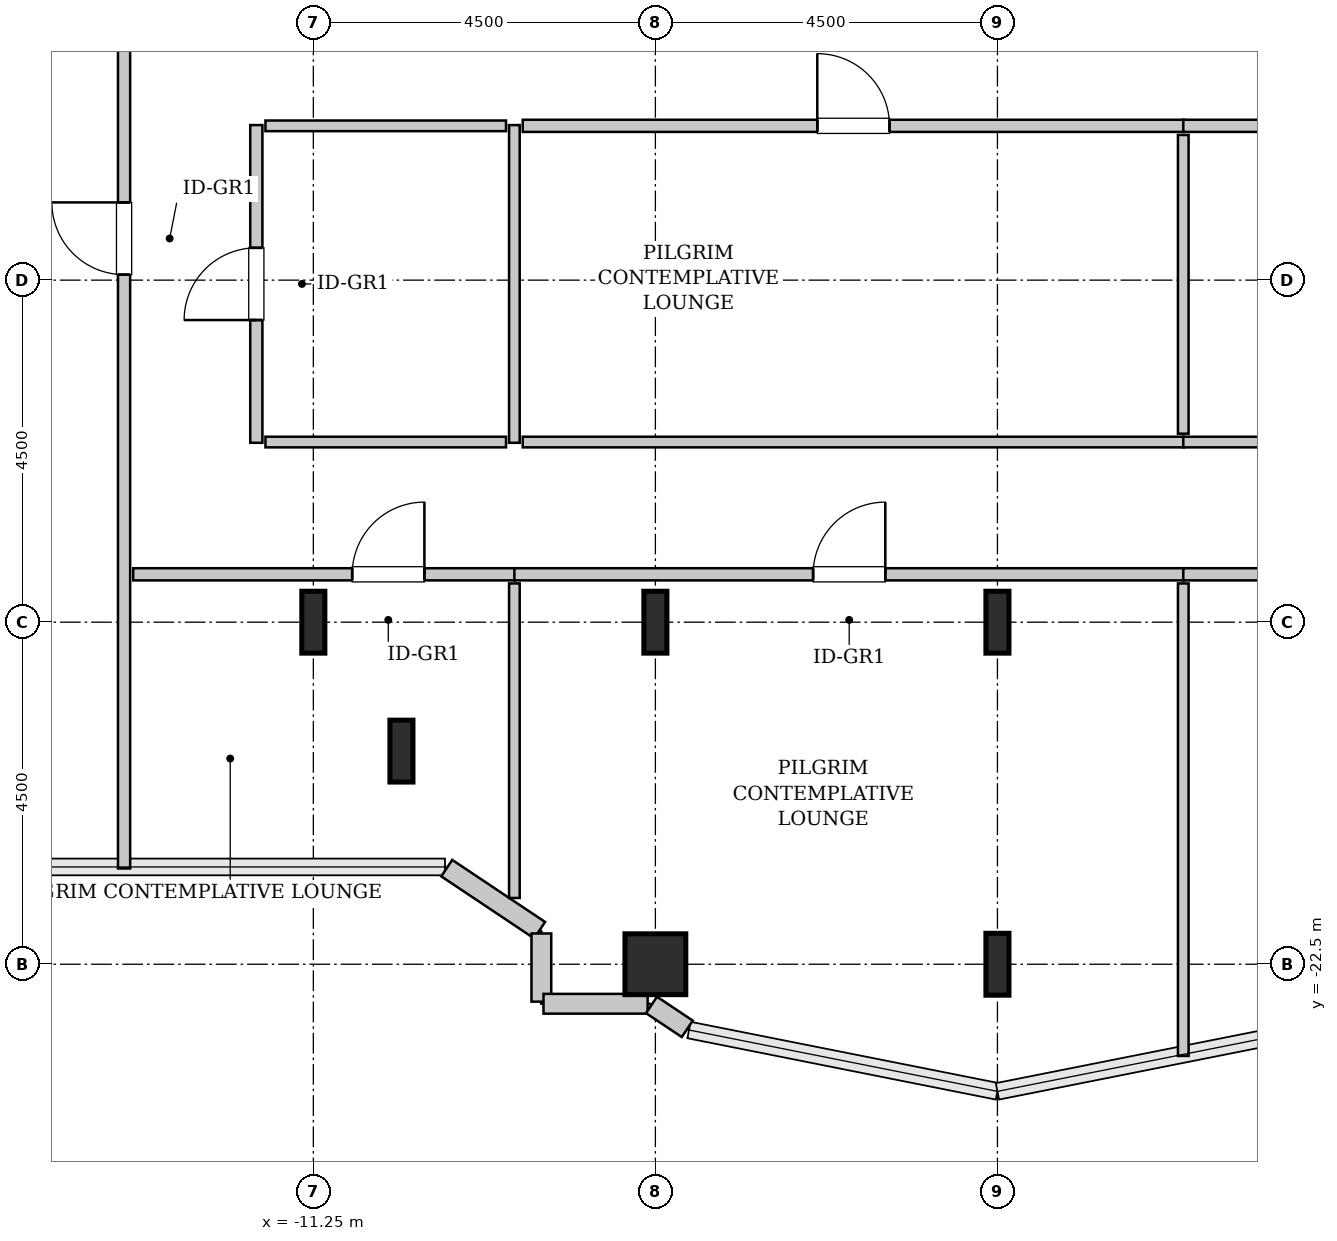
"""IFC4 building model, lengths in metres.
Left out: names, types, materials, properties, quantities, classifications, styles, units other than length and angle.
Written with IfcOpenShell. Run it as: python <this file> out.ifc"""

import sys

from ifc_helpers import new_model, si_unit, direction, frame, frame_2d, origin, origin_2d, place, context, subcontext, project, spatial, rectangle, hollow_rectangle, i_section, extrude, source, transform, mapped, element, fill, save


model = new_model("IFC4")
c1 = context("Model", 3, precision=1e-05, world=origin(), true_north=direction((0.0, 1.0)))
c2 = subcontext(c1, "Body", "Model", "MODEL_VIEW")
j1 = project(units=[si_unit("LENGTHUNIT", "METRE"), si_unit("PLANEANGLEUNIT", "RADIAN")], contexts=[c1])
p1 = place(None, origin())
s1 = spatial("IfcSite", under=j1, at=p1, CompositionType="ELEMENT")
p2 = place(p1, origin())
s2 = spatial("IfcBuilding", under=s1, at=p2, CompositionType="ELEMENT")
p3 = place(p2, frame((0.0, 0.0, 167.8)))
s3 = spatial("IfcBuildingStorey", under=s2, at=p3, CompositionType="ELEMENT", Elevation=167.8)
m1 = source(origin(), c2, "Body", "SweptSolid", [
    extrude(i_section(OverallWidth=0.303, OverallDepth=0.814, WebThickness=0.021, FlangeThickness=0.04, FilletRadius=0.03, at=origin_2d()), origin(), (0.0, 0.0, 1.0), 3.8),
])
for number, where, z_axis, x_axis in (
    (1, (-11.25, -18.0, 0.0), (0.0, 0.0, 1.0), (1.0, 0.0, 0.0)),
    (2, (-10.091, -19.696, 0.0), (0.0, 0.0, 1.0), (1.0, 0.0, 0.0)),
):
    element("IfcColumn", number, at=place(p3, frame(where, z_axis=z_axis, x_axis=x_axis)), inside=s3, PredefinedType="COLUMN", context=c2, shape_type="MappedRepresentation", body=[
        mapped(m1, transform((0.0, 0.0, 0.0), x_axis=(1.0, 0.0, 0.0), y_axis=(0.0, 1.0, 0.0), z_axis=(0.0, 0.0, 1.0), scale=1.0)),
    ])
m2 = source(origin(), c2, "Body", "SweptSolid", [
    extrude(hollow_rectangle(XDim=0.8, YDim=0.8, WallThickness=0.04, InnerFilletRadius=0.04, OuterFilletRadius=0.08, at=origin_2d()), origin(), (0.0, 0.0, 1.0), 3.8),
])
p4 = place(p3, frame((-6.75, -22.5, 0.0), z_axis=(0.0, 0.0, 1.0), x_axis=(1.0, 0.0, 0.0)))
e3 = element("IfcColumn", 3, at=p4, inside=s3, PredefinedType="COLUMN", context=c2, shape_type="MappedRepresentation", body=[
    mapped(m2, transform((0.0, 0.0, 0.0), x_axis=(1.0, 0.0, 0.0), y_axis=(0.0, 1.0, 0.0), z_axis=(0.0, 0.0, 1.0), scale=1.0)),
])
for number, where, z_axis, x_axis in (
    (4, (-6.75, -18.0, 0.0), (0.0, 0.0, 1.0), (1.0, 0.0, 0.0)),
    (5, (-2.25, -22.5, 0.0), (0.0, 0.0, 1.0), (1.0, 0.0, 0.0)),
    (6, (-2.25, -18.0, 0.0), (0.0, 0.0, 1.0), (1.0, 0.0, 0.0)),
):
    element("IfcColumn", number, at=place(p3, frame(where, z_axis=z_axis, x_axis=x_axis)), inside=s3, PredefinedType="COLUMN", context=c2, shape_type="MappedRepresentation", body=[
        mapped(m1, transform((0.0, 0.0, 0.0), x_axis=(1.0, 0.0, 0.0), y_axis=(0.0, 1.0, 0.0), z_axis=(0.0, 0.0, 1.0), scale=1.0)),
    ])
m3 = source(origin(), c2, "Body", "SweptSolid", [
    extrude(rectangle(XDim=1.469, YDim=0.26, at=frame_2d((0.734, 0.0))), origin(), (0.0, 0.0, 1.0), 3.55),
])
p5 = place(p3, frame((-9.495, -21.236, 0.0), z_axis=(0.0, 0.0, 1.0), x_axis=(0.831461760506, -0.555581983884, 0.0)))
e7 = element("IfcWall", 7, at=p5, inside=s3, PredefinedType="SOLIDWALL", context=c2, shape_type="MappedRepresentation", body=[
    mapped(m3, transform((0.0, 0.0, 0.0), x_axis=(1.0, 0.0, 0.0), y_axis=(0.0, 1.0, 0.0), z_axis=(0.0, 0.0, 1.0), scale=1.0)),
])
m4 = source(origin(), c2, "Body", "SweptSolid", [
    extrude(rectangle(XDim=0.897, YDim=0.26, at=frame_2d((0.448, 0.0))), origin(), (0.0, 0.0, 1.0), 3.55),
])
p6 = place(p3, frame((-8.25, -22.095, 0.0), z_axis=(0.0, 0.0, 1.0), x_axis=(0.0, -1.0, 0.0)))
e8 = element("IfcWall", 8, at=p6, inside=s3, PredefinedType="SOLIDWALL", context=c2, shape_type="MappedRepresentation", body=[
    mapped(m4, transform((0.0, 0.0, 0.0), x_axis=(1.0, 0.0, 0.0), y_axis=(0.0, 1.0, 0.0), z_axis=(0.0, 0.0, 1.0), scale=1.0)),
])
m5 = source(origin(), c2, "Body", "SweptSolid", [
    extrude(rectangle(XDim=1.37, YDim=0.26, at=frame_2d((0.685, 0.0))), origin(), (0.0, 0.0, 1.0), 3.55),
])
p7 = place(p3, frame((-8.222, -23.02, 0.0), z_axis=(0.0, 0.0, 1.0), x_axis=(1.0, 0.0, 0.0)))
e9 = element("IfcWall", 9, at=p7, inside=s3, PredefinedType="SOLIDWALL", context=c2, shape_type="MappedRepresentation", body=[
    mapped(m5, transform((0.0, 0.0, 0.0), x_axis=(1.0, 0.0, 0.0), y_axis=(0.0, 1.0, 0.0), z_axis=(0.0, 0.0, 1.0), scale=1.0)),
])
m6 = source(origin(), c2, "Body", "SweptSolid", [
    extrude(rectangle(XDim=0.565, YDim=0.26, at=frame_2d((0.283, 0.0))), origin(), (0.0, 0.0, 1.0), 3.55),
])
p8 = place(p3, frame((-6.801, -23.036, 0.0), z_axis=(0.0, 0.0, 1.0), x_axis=(0.831651492666, -0.555297933317, 0.0)))
e10 = element("IfcWall", 10, at=p8, inside=s3, PredefinedType="SOLIDWALL", context=c2, shape_type="MappedRepresentation", body=[
    mapped(m6, transform((0.0, 0.0, 0.0), x_axis=(1.0, 0.0, 0.0), y_axis=(0.0, 1.0, 0.0), z_axis=(0.0, 0.0, 1.0), scale=1.0)),
])
m7 = source(origin(), c2, "Body", "SweptSolid", [
    extrude(rectangle(XDim=12.745, YDim=0.16, at=frame_2d((6.373, 0.0))), origin(), (0.0, 0.0, 1.0), 3.535),
])
p9 = place(p3, frame((-13.74, -21.24, 0.0), z_axis=(0.0, 0.0, 1.0), x_axis=(0.0, 1.0, 0.0)))
e11 = element("IfcWall", 11, at=p9, inside=s3, PredefinedType="PARTITIONING", context=c2, shape_type="MappedRepresentation", body=[
    mapped(m7, transform((0.0, 0.0, 0.0), x_axis=(1.0, 0.0, 0.0), y_axis=(0.0, 1.0, 0.0), z_axis=(0.0, 0.0, 1.0), scale=1.0)),
])
p10 = place(p9, frame((7.812, 0.0, 0.0)))
e12 = element("IfcOpeningElement", 12, at=p10, cuts=e11, PredefinedType="OPENING", context=c2, shape_type="SweptSolid", body=[
    extrude(rectangle(XDim=0.95, YDim=2.1, at=frame_2d((0.475, 1.05))), frame((0.0, 0.09, 0.0), z_axis=(0.0, -1.0, 0.0), x_axis=(1.0, 0.0, 0.0)), (0.0, 0.0, 1.0), 0.18),
])
m8 = source(origin(), c2, "Body", "SweptSolid", [
    extrude(rectangle(XDim=5.025, YDim=0.16, at=frame_2d((2.513, 0.0))), origin(), (0.0, 0.0, 1.0), 3.535),
])
p11 = place(p3, frame((-13.62, -17.37, 0.0), z_axis=(0.0, 0.0, 1.0), x_axis=(1.0, 0.0, 0.0)))
e13 = element("IfcWall", 13, at=p11, inside=s3, PredefinedType="PARTITIONING", context=c2, shape_type="MappedRepresentation", body=[
    mapped(m8, transform((0.0, 0.0, 0.0), x_axis=(1.0, 0.0, 0.0), y_axis=(0.0, 1.0, 0.0), z_axis=(0.0, 0.0, 1.0), scale=1.0)),
])
p12 = place(p11, frame((2.881, 0.0, 0.0)))
e14 = element("IfcOpeningElement", 14, at=p12, cuts=e13, PredefinedType="OPENING", context=c2, shape_type="SweptSolid", body=[
    extrude(rectangle(XDim=0.95, YDim=2.1, at=frame_2d((0.475, 1.05))), frame((0.0, 0.09, 0.0), z_axis=(0.0, -1.0, 0.0), x_axis=(1.0, 0.0, 0.0)), (0.0, 0.0, 1.0), 0.18),
])
m9 = source(origin(), c2, "Body", "SweptSolid", [
    extrude(rectangle(XDim=4.138, YDim=0.14, at=frame_2d((2.069, 0.0))), origin(), (0.0, 0.0, 1.0), 3.535),
])
p13 = place(p3, frame((-8.605, -21.628, 0.0), z_axis=(0.0, 0.0, 1.0), x_axis=(0.0, 1.0, 0.0)))
e15 = element("IfcWall", 15, at=p13, inside=s3, PredefinedType="PARTITIONING", context=c2, shape_type="MappedRepresentation", body=[
    mapped(m9, transform((0.0, 0.0, 0.0), x_axis=(1.0, 0.0, 0.0), y_axis=(0.0, 1.0, 0.0), z_axis=(0.0, 0.0, 1.0), scale=1.0)),
])
m10 = source(origin(), c2, "Body", "SweptSolid", [
    extrude(rectangle(XDim=4.18, YDim=0.16, at=frame_2d((2.09, 0.0))), origin(), (0.0, 0.0, 1.0), 3.535),
])
p14 = place(p3, frame((-12.0, -15.64, 0.0), z_axis=(0.0, 0.0, 1.0), x_axis=(0.0, 1.0, 0.0)))
e16 = element("IfcWall", 16, at=p14, inside=s3, PredefinedType="PARTITIONING", context=c2, shape_type="MappedRepresentation", body=[
    mapped(m10, transform((0.0, 0.0, 0.0), x_axis=(1.0, 0.0, 0.0), y_axis=(0.0, 1.0, 0.0), z_axis=(0.0, 0.0, 1.0), scale=1.0)),
])
p15 = place(p14, frame((1.615, 0.0, 0.0)))
e17 = element("IfcOpeningElement", 17, at=p15, cuts=e16, PredefinedType="OPENING", context=c2, shape_type="SweptSolid", body=[
    extrude(rectangle(XDim=0.95, YDim=2.1, at=frame_2d((0.475, 1.05))), frame((0.0, 0.09, 0.0), z_axis=(0.0, -1.0, 0.0), x_axis=(1.0, 0.0, 0.0)), (0.0, 0.0, 1.0), 0.18),
])
m11 = source(origin(), c2, "Body", "SweptSolid", [
    extrude(rectangle(XDim=4.18, YDim=0.14, at=frame_2d((2.09, 0.0))), origin(), (0.0, 0.0, 1.0), 3.535),
])
p16 = place(p3, frame((-8.605, -15.64, 0.0), z_axis=(0.0, 0.0, 1.0), x_axis=(0.0, 1.0, 0.0)))
e18 = element("IfcWall", 18, at=p16, inside=s3, PredefinedType="PARTITIONING", context=c2, shape_type="MappedRepresentation", body=[
    mapped(m11, transform((0.0, 0.0, 0.0), x_axis=(1.0, 0.0, 0.0), y_axis=(0.0, 1.0, 0.0), z_axis=(0.0, 0.0, 1.0), scale=1.0)),
])
m12 = source(origin(), c2, "Body", "SweptSolid", [
    extrude(rectangle(XDim=3.165, YDim=0.14, at=frame_2d((1.583, 0.0))), origin(), (0.0, 0.0, 1.0), 3.535),
])
for number, where, z_axis, x_axis in (
    (19, (-11.88, -11.47, 0.0), (0.0, 0.0, 1.0), (1.0, 0.0, 0.0)),
    (20, (-11.88, -15.63, 0.0), (0.0, 0.0, 1.0), (1.0, 0.0, 0.0)),
):
    element("IfcWall", number, at=place(p3, frame(where, z_axis=z_axis, x_axis=x_axis)), inside=s3, PredefinedType="PARTITIONING", context=c2, shape_type="MappedRepresentation", body=[
        mapped(m12, transform((0.0, 0.0, 0.0), x_axis=(1.0, 0.0, 0.0), y_axis=(0.0, 1.0, 0.0), z_axis=(0.0, 0.0, 1.0), scale=1.0)),
    ])
m13 = source(origin(), c2, "Body", "SweptSolid", [
    extrude(rectangle(XDim=8.81, YDim=0.16, at=frame_2d((4.405, 0.0))), origin(), (0.0, 0.0, 1.0), 3.535),
])
p17 = place(p3, frame((-8.605, -17.37, 0.0), z_axis=(0.0, 0.0, 1.0), x_axis=(1.0, 0.0, 0.0)))
e21 = element("IfcWall", 21, at=p17, inside=s3, PredefinedType="PARTITIONING", context=c2, shape_type="MappedRepresentation", body=[
    mapped(m13, transform((0.0, 0.0, 0.0), x_axis=(1.0, 0.0, 0.0), y_axis=(0.0, 1.0, 0.0), z_axis=(0.0, 0.0, 1.0), scale=1.0)),
])
p18 = place(p17, frame((3.93, 0.0, 0.0)))
e22 = element("IfcOpeningElement", 22, at=p18, cuts=e21, PredefinedType="OPENING", context=c2, shape_type="SweptSolid", body=[
    extrude(rectangle(XDim=0.95, YDim=2.1, at=frame_2d((0.475, 1.05))), frame((0.0, 0.09, 0.0), z_axis=(0.0, -1.0, 0.0), x_axis=(1.0, 0.0, 0.0)), (0.0, 0.0, 1.0), 0.18),
])
m14 = source(origin(), c2, "Body", "SweptSolid", [
    extrude(rectangle(XDim=6.216, YDim=0.14, at=frame_2d((3.108, 0.0))), origin(), (0.0, 0.0, 1.0), 3.535),
])
p19 = place(p3, frame((0.195, -23.706, 0.0), z_axis=(0.0, 0.0, 1.0), x_axis=(0.0, 1.0, 0.0)))
e23 = element("IfcWall", 23, at=p19, inside=s3, PredefinedType="PARTITIONING", context=c2, shape_type="MappedRepresentation", body=[
    mapped(m14, transform((0.0, 0.0, 0.0), x_axis=(1.0, 0.0, 0.0), y_axis=(0.0, 1.0, 0.0), z_axis=(0.0, 0.0, 1.0), scale=1.0)),
])
m15 = source(origin(), c2, "Body", "SweptSolid", [
    extrude(rectangle(XDim=8.7, YDim=0.16, at=frame_2d((4.35, 0.0))), origin(), (0.0, 0.0, 1.0), 3.535),
])
p20 = place(p3, frame((-8.495, -11.47, 0.0), z_axis=(0.0, 0.0, 1.0), x_axis=(1.0, 0.0, 0.0)))
e24 = element("IfcWall", 24, at=p20, inside=s3, PredefinedType="PARTITIONING", context=c2, shape_type="MappedRepresentation", body=[
    mapped(m15, transform((0.0, 0.0, 0.0), x_axis=(1.0, 0.0, 0.0), y_axis=(0.0, 1.0, 0.0), z_axis=(0.0, 0.0, 1.0), scale=1.0)),
])
p21 = place(p20, frame((3.875, 0.0, 0.0)))
e25 = element("IfcOpeningElement", 25, at=p21, cuts=e24, PredefinedType="OPENING", context=c2, shape_type="SweptSolid", body=[
    extrude(rectangle(XDim=0.95, YDim=2.1, at=frame_2d((0.475, 1.05))), frame((0.0, 0.09, 0.0), z_axis=(0.0, -1.0, 0.0), x_axis=(1.0, 0.0, 0.0)), (0.0, 0.0, 1.0), 0.18),
])
m16 = source(origin(), c2, "Body", "SweptSolid", [
    extrude(rectangle(XDim=8.7, YDim=0.14, at=frame_2d((4.35, 0.0))), origin(), (0.0, 0.0, 1.0), 3.535),
])
p22 = place(p3, frame((-8.495, -15.63, 0.0), z_axis=(0.0, 0.0, 1.0), x_axis=(1.0, 0.0, 0.0)))
e26 = element("IfcWall", 26, at=p22, inside=s3, PredefinedType="PARTITIONING", context=c2, shape_type="MappedRepresentation", body=[
    mapped(m16, transform((0.0, 0.0, 0.0), x_axis=(1.0, 0.0, 0.0), y_axis=(0.0, 1.0, 0.0), z_axis=(0.0, 0.0, 1.0), scale=1.0)),
])
m17 = source(origin(), c2, "Body", "SweptSolid", [
    extrude(rectangle(XDim=3.93, YDim=0.14, at=frame_2d((1.965, 0.0))), origin(), (0.0, 0.0, 1.0), 3.535),
])
p23 = place(p3, frame((0.195, -15.52, 0.0), z_axis=(0.0, 0.0, 1.0), x_axis=(0.0, 1.0, 0.0)))
e27 = element("IfcWall", 27, at=p23, inside=s3, PredefinedType="PARTITIONING", context=c2, shape_type="MappedRepresentation", body=[
    mapped(m17, transform((0.0, 0.0, 0.0), x_axis=(1.0, 0.0, 0.0), y_axis=(0.0, 1.0, 0.0), z_axis=(0.0, 0.0, 1.0), scale=1.0)),
])
m18 = source(origin(), c2, "Body", "SweptSolid", [
    extrude(rectangle(XDim=7.41, YDim=0.16, at=frame_2d((3.705, 0.0))), origin(), (0.0, 0.0, 1.0), 3.535),
])
p24 = place(p3, frame((0.195, -17.37, 0.0), z_axis=(0.0, 0.0, 1.0), x_axis=(1.0, 0.0, 0.0)))
e28 = element("IfcWall", 28, at=p24, inside=s3, PredefinedType="PARTITIONING", context=c2, shape_type="MappedRepresentation", body=[
    mapped(m18, transform((0.0, 0.0, 0.0), x_axis=(1.0, 0.0, 0.0), y_axis=(0.0, 1.0, 0.0), z_axis=(0.0, 0.0, 1.0), scale=1.0)),
])
p25 = place(p24, frame((3.23, 0.0, 0.0)))
e29 = element("IfcOpeningElement", 29, at=p25, cuts=e28, PredefinedType="OPENING", context=c2, shape_type="SweptSolid", body=[
    extrude(rectangle(XDim=0.95, YDim=2.1, at=frame_2d((0.475, 1.05))), frame((0.0, 0.09, 0.0), z_axis=(0.0, -1.0, 0.0), x_axis=(1.0, 0.0, 0.0)), (0.0, 0.0, 1.0), 0.18),
])
p26 = place(p3, frame((0.195, -11.47, 0.0), z_axis=(0.0, 0.0, 1.0), x_axis=(1.0, 0.0, 0.0)))
e30 = element("IfcWall", 30, at=p26, inside=s3, PredefinedType="PARTITIONING", context=c2, shape_type="MappedRepresentation", body=[
    mapped(m18, transform((0.0, 0.0, 0.0), x_axis=(1.0, 0.0, 0.0), y_axis=(0.0, 1.0, 0.0), z_axis=(0.0, 0.0, 1.0), scale=1.0)),
])
p27 = place(p26, frame((3.23, 0.0, 0.0)))
e31 = element("IfcOpeningElement", 31, at=p27, cuts=e30, PredefinedType="OPENING", context=c2, shape_type="SweptSolid", body=[
    extrude(rectangle(XDim=0.95, YDim=2.1, at=frame_2d((0.475, 1.05))), frame((0.0, 0.09, 0.0), z_axis=(0.0, -1.0, 0.0), x_axis=(1.0, 0.0, 0.0)), (0.0, 0.0, 1.0), 0.18),
])
m19 = source(origin(), c2, "Body", "SweptSolid", [
    extrude(rectangle(XDim=7.41, YDim=0.14, at=frame_2d((3.705, 0.0))), origin(), (0.0, 0.0, 1.0), 3.535),
])
p28 = place(p3, frame((0.195, -15.63, 0.0), z_axis=(0.0, 0.0, 1.0), x_axis=(1.0, 0.0, 0.0)))
e32 = element("IfcWall", 32, at=p28, inside=s3, PredefinedType="PARTITIONING", context=c2, shape_type="MappedRepresentation", body=[
    mapped(m19, transform((0.0, 0.0, 0.0), x_axis=(1.0, 0.0, 0.0), y_axis=(0.0, 1.0, 0.0), z_axis=(0.0, 0.0, 1.0), scale=1.0)),
])
m20 = source(origin(), c2, "Body", "SweptSolid", [
    extrude(rectangle(XDim=0.95, YDim=2.1, at=frame_2d((0.475, 1.05))), frame((0.0, 0.025, 0.0), z_axis=(0.0, -1.0, 0.0), x_axis=(1.0, 0.0, 0.0)), (0.0, 0.0, 1.0), 0.05),
])
p29 = place(p10, origin())
e33 = element("IfcDoor", 33, at=p29, inside=s3, OperationType="SINGLE_SWING_RIGHT", PredefinedType="DOOR", context=c2, shape_type="MappedRepresentation", body=[
    mapped(m20, transform((0.0, 0.0, 0.0), x_axis=(1.0, 0.0, 0.0), y_axis=(0.0, 1.0, 0.0), z_axis=(0.0, 0.0, 1.0), scale=1.0)),
])
fill(e12, e33)
p30 = place(p12, origin())
e34 = element("IfcDoor", 34, at=p30, inside=s3, OperationType="SINGLE_SWING_RIGHT", PredefinedType="DOOR", context=c2, shape_type="MappedRepresentation", body=[
    mapped(m20, transform((0.0, 0.0, 0.0), x_axis=(1.0, 0.0, 0.0), y_axis=(0.0, 1.0, 0.0), z_axis=(0.0, 0.0, 1.0), scale=1.0)),
])
fill(e14, e34)
p31 = place(p15, origin())
e35 = element("IfcDoor", 35, at=p31, inside=s3, OperationType="SINGLE_SWING_LEFT", PredefinedType="DOOR", context=c2, shape_type="MappedRepresentation", body=[
    mapped(m20, transform((0.0, 0.0, 0.0), x_axis=(1.0, 0.0, 0.0), y_axis=(0.0, 1.0, 0.0), z_axis=(0.0, 0.0, 1.0), scale=1.0)),
])
fill(e17, e35)
p32 = place(p18, origin())
e36 = element("IfcDoor", 36, at=p32, inside=s3, OperationType="SINGLE_SWING_RIGHT", PredefinedType="DOOR", context=c2, shape_type="MappedRepresentation", body=[
    mapped(m20, transform((0.0, 0.0, 0.0), x_axis=(1.0, 0.0, 0.0), y_axis=(0.0, 1.0, 0.0), z_axis=(0.0, 0.0, 1.0), scale=1.0)),
])
fill(e22, e36)
p33 = place(p21, origin())
e37 = element("IfcDoor", 37, at=p33, inside=s3, OperationType="SINGLE_SWING_LEFT", PredefinedType="DOOR", context=c2, shape_type="MappedRepresentation", body=[
    mapped(m20, transform((0.0, 0.0, 0.0), x_axis=(1.0, 0.0, 0.0), y_axis=(0.0, 1.0, 0.0), z_axis=(0.0, 0.0, 1.0), scale=1.0)),
])
fill(e25, e37)
save(model, sys.argv[1])
